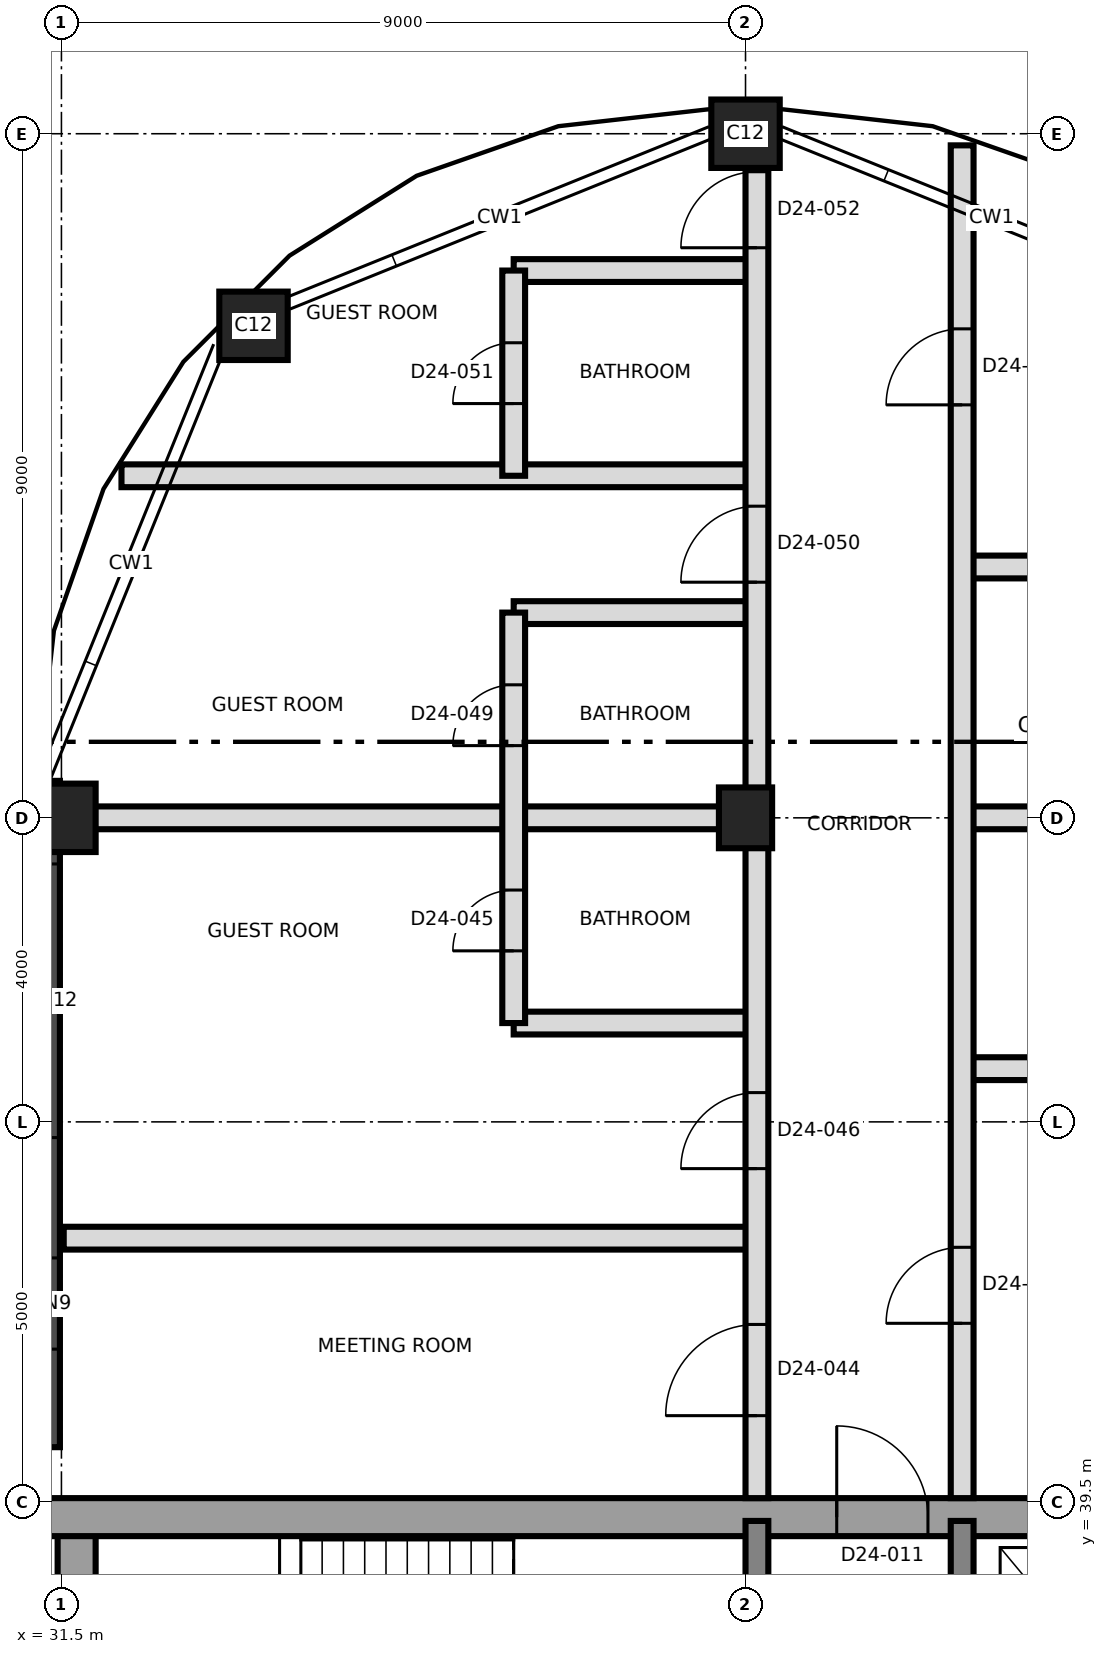
"""IFC4 building model, lengths in metres.
Left out: names, types, materials, properties, quantities, classifications, styles, units other than length and angle.
Written with IfcOpenShell. Run it as: python <this file> out.ifc"""

import sys

from ifc_helpers import new_model, si_unit, direction, frame, frame_2d, origin, origin_2d, place, context, subcontext, project, spatial, rectangle, extrude, element, fill, save


model = new_model("IFC4")
c1 = context("Model", 3, precision=1e-05, world=origin(), true_north=direction((0.0, 1.0)))
c2 = subcontext(c1, "Body", "Model", "MODEL_VIEW")
j1 = project(units=[si_unit("LENGTHUNIT", "METRE"), si_unit("PLANEANGLEUNIT", "RADIAN")], contexts=[c1])
p1 = place(None, origin())
s1 = spatial("IfcSite", under=j1, at=p1, CompositionType="ELEMENT")
p2 = place(p1, origin())
s2 = spatial("IfcBuilding", under=s1, at=p2, CompositionType="ELEMENT")
p3 = place(p2, frame((0.0, 0.0, 218.0)))
s3 = spatial("IfcBuildingStorey", under=s2, at=p3, CompositionType="ELEMENT", Elevation=218.0)
p4 = place(p3, frame((31.7, 21.75, 0.0), z_axis=(0.0, 0.0, 1.0), x_axis=(0.0, 1.0, 0.0)))
e1 = element("IfcWall", 1, at=p4, inside=s3, PredefinedType="SHEAR", context=c2, shape_type="SweptSolid", body=[
    extrude(rectangle(XDim=17.5, YDim=0.5, at=frame_2d((8.75, 0.0))), origin(), (0.0, 0.0, 1.0), 3.7),
])
p5 = place(p3, frame((31.25, 39.3, 0.0), z_axis=(0.0, 0.0, 1.0), x_axis=(1.0, 0.0, 0.0)))
e2 = element("IfcWall", 2, at=p5, inside=s3, PredefinedType="SHEAR", context=c2, shape_type="SweptSolid", body=[
    extrude(rectangle(XDim=27.0, YDim=0.5, at=frame_2d((13.5, 0.0))), origin(), (0.0, 0.0, 1.0), 3.7),
])
p6 = place(p5, frame((10.45, 0.0, 0.0)))
e3 = element("IfcOpeningElement", 3, at=p6, cuts=e2, PredefinedType="OPENING", context=c2, shape_type="SweptSolid", body=[
    extrude(rectangle(XDim=1.2, YDim=2.1, at=frame_2d((0.6, 1.05))), frame((0.0, 0.26, 0.0), z_axis=(0.0, -1.0, 0.0), x_axis=(1.0, 0.0, 0.0)), (0.0, 0.0, 1.0), 0.52),
])
for number, where, z_axis, x_axis in (
    (4, (40.65, 33.5, 0.0), (0.0, 0.0, 1.0), (0.0, 1.0, 0.0)),
    (5, (43.35, 33.5, 0.0), (0.0, 0.0, 1.0), (0.0, 1.0, 0.0)),
):
    element("IfcWall", number, at=place(p3, frame(where, z_axis=z_axis, x_axis=x_axis)), inside=s3, PredefinedType="SHEAR", context=c2, shape_type="SweptSolid", body=[
        extrude(rectangle(XDim=5.75, YDim=0.3, at=frame_2d((2.875, 0.0))), origin(), (0.0, 0.0, 1.0), 3.7),
    ])
p7 = place(p3, frame((31.5, 48.5, 0.0), z_axis=(0.0, 0.0, 1.0), x_axis=(1.0, 0.0, 0.0)))
e6 = element("IfcColumn", 6, at=p7, inside=s3, PredefinedType="COLUMN", context=c2, shape_type="SweptSolid", body=[
    extrude(rectangle(XDim=0.9, YDim=0.9, at=origin_2d()), origin(), (0.0, 0.0, 1.0), 3.7),
])
p8 = place(p3, frame((40.5, 48.5, 0.0), z_axis=(0.0, 0.0, 1.0), x_axis=(0.0, 1.0, 0.0)))
e7 = element("IfcColumn", 7, at=p8, inside=s3, PredefinedType="COLUMN", context=c2, shape_type="SweptSolid", body=[
    extrude(rectangle(XDim=0.8, YDim=0.7, at=origin_2d()), origin(), (0.0, 0.0, 1.0), 3.7),
])
for number, where, z_axis, x_axis in (
    (8, (34.027, 54.973, 0.0), (0.0, 0.0, 1.0), (1.0, 0.0, 0.0)),
    (9, (40.5, 57.5, 0.0), (0.0, 0.0, 1.0), (1.0, 0.0, 0.0)),
):
    element("IfcColumn", number, at=place(p3, frame(where, z_axis=z_axis, x_axis=x_axis)), inside=s3, PredefinedType="COLUMN", context=c2, shape_type="SweptSolid", body=[
        extrude(rectangle(XDim=0.9, YDim=0.9, at=origin_2d()), origin(), (0.0, 0.0, 1.0), 3.7),
    ])
p9 = place(p3, frame((31.33, 48.986, 0.0), z_axis=(0.0, 0.0, 1.0), x_axis=(0.0, -1.0, 0.0)))
e10 = element("IfcWall", 10, at=p9, inside=s3, PredefinedType="SOLIDWALL", context=c2, shape_type="SweptSolid", body=[
    extrude(rectangle(XDim=8.766, YDim=0.3, at=frame_2d((4.383, 0.0))), origin(), (0.0, 0.0, 1.0), 3.4),
])
p10 = place(p9, frame((1.093, 0.0, 0.9)))
e11 = element("IfcOpeningElement", 11, at=p10, cuts=e10, PredefinedType="OPENING", context=c2, shape_type="SweptSolid", body=[
    extrude(rectangle(XDim=3.6, YDim=1.5, at=frame_2d((1.8, 0.75))), frame((0.0, 0.16, 0.0), z_axis=(0.0, -1.0, 0.0), x_axis=(1.0, 0.0, 0.0)), (0.0, 0.0, 1.0), 0.32),
])
p11 = place(p9, frame((6.276, 0.0, 0.9)))
e12 = element("IfcOpeningElement", 12, at=p11, cuts=e10, PredefinedType="OPENING", context=c2, shape_type="SweptSolid", body=[
    extrude(rectangle(XDim=1.2, YDim=1.5, at=frame_2d((0.6, 0.75))), frame((0.0, 0.16, 0.0), z_axis=(0.0, -1.0, 0.0), x_axis=(1.0, 0.0, 0.0)), (0.0, 0.0, 1.0), 0.32),
])
p12 = place(p3, frame((31.53, 42.97, 0.0), z_axis=(0.0, 0.0, 1.0), x_axis=(1.0, 0.0, 0.0)))
e13 = element("IfcWall", 13, at=p12, inside=s3, PredefinedType="PARTITIONING", context=c2, shape_type="SweptSolid", body=[
    extrude(rectangle(XDim=9.12, YDim=0.3, at=frame_2d((4.56, 0.0))), origin(), (0.0, 0.0, 1.0), 3.4),
])
p13 = place(p3, frame((43.35, 45.2, 0.0), z_axis=(0.0, 0.0, 1.0), x_axis=(1.0, 0.0, 0.0)))
e14 = element("IfcWall", 14, at=p13, inside=s3, PredefinedType="PARTITIONING", context=c2, shape_type="SweptSolid", body=[
    extrude(rectangle(XDim=3.5, YDim=0.3, at=frame_2d((1.75, 0.0))), origin(), (0.0, 0.0, 1.0), 3.4),
])
p14 = place(p3, frame((37.45, 45.8, 0.0), z_axis=(0.0, 0.0, 1.0), x_axis=(1.0, 0.0, 0.0)))
e15 = element("IfcWall", 15, at=p14, inside=s3, PredefinedType="PARTITIONING", context=c2, shape_type="SweptSolid", body=[
    extrude(rectangle(XDim=3.2, YDim=0.3, at=frame_2d((1.6, 0.0))), origin(), (0.0, 0.0, 1.0), 3.4),
])
p15 = place(p3, frame((31.53, 48.5, 0.0), z_axis=(0.0, 0.0, 1.0), x_axis=(1.0, 0.0, 0.0)))
e16 = element("IfcWall", 16, at=p15, inside=s3, PredefinedType="PARTITIONING", context=c2, shape_type="SweptSolid", body=[
    extrude(rectangle(XDim=9.12, YDim=0.3, at=frame_2d((4.56, 0.0))), origin(), (0.0, 0.0, 1.0), 3.4),
])
p16 = place(p3, frame((43.35, 48.5, 0.0), z_axis=(0.0, 0.0, 1.0), x_axis=(1.0, 0.0, 0.0)))
e17 = element("IfcWall", 17, at=p16, inside=s3, PredefinedType="PARTITIONING", context=c2, shape_type="SweptSolid", body=[
    extrude(rectangle(XDim=6.12, YDim=0.3, at=frame_2d((3.06, 0.0))), origin(), (0.0, 0.0, 1.0), 3.4),
])
p17 = place(p3, frame((37.45, 51.2, 0.0), z_axis=(0.0, 0.0, 1.0), x_axis=(1.0, 0.0, 0.0)))
e18 = element("IfcWall", 18, at=p17, inside=s3, PredefinedType="PARTITIONING", context=c2, shape_type="SweptSolid", body=[
    extrude(rectangle(XDim=3.2, YDim=0.3, at=frame_2d((1.6, 0.0))), origin(), (0.0, 0.0, 1.0), 3.4),
])
p18 = place(p3, frame((43.35, 51.8, 0.0), z_axis=(0.0, 0.0, 1.0), x_axis=(1.0, 0.0, 0.0)))
e19 = element("IfcWall", 19, at=p18, inside=s3, PredefinedType="PARTITIONING", context=c2, shape_type="SweptSolid", body=[
    extrude(rectangle(XDim=3.5, YDim=0.3, at=frame_2d((1.75, 0.0))), origin(), (0.0, 0.0, 1.0), 3.4),
])
p19 = place(p3, frame((32.29, 53.0, 0.0), z_axis=(0.0, 0.0, 1.0), x_axis=(1.0, 0.0, 0.0)))
e20 = element("IfcWall", 20, at=p19, inside=s3, PredefinedType="PARTITIONING", context=c2, shape_type="SweptSolid", body=[
    extrude(rectangle(XDim=8.36, YDim=0.3, at=frame_2d((4.18, 0.0))), origin(), (0.0, 0.0, 1.0), 3.4),
])
p20 = place(p3, frame((37.45, 55.7, 0.0), z_axis=(0.0, 0.0, 1.0), x_axis=(1.0, 0.0, 0.0)))
e21 = element("IfcWall", 21, at=p20, inside=s3, PredefinedType="PARTITIONING", context=c2, shape_type="SweptSolid", body=[
    extrude(rectangle(XDim=3.2, YDim=0.3, at=frame_2d((1.6, 0.0))), origin(), (0.0, 0.0, 1.0), 3.4),
])
p21 = place(p3, frame((37.45, 45.8, 0.0), z_axis=(0.0, 0.0, 1.0), x_axis=(0.0, 1.0, 0.0)))
e22 = element("IfcWall", 22, at=p21, inside=s3, PredefinedType="PARTITIONING", context=c2, shape_type="SweptSolid", body=[
    extrude(rectangle(XDim=5.4, YDim=0.3, at=frame_2d((2.7, 0.0))), origin(), (0.0, 0.0, 1.0), 3.4),
])
p22 = place(p21, frame((0.95, 0.0, 0.0)))
e23 = element("IfcOpeningElement", 23, at=p22, cuts=e22, PredefinedType="OPENING", context=c2, shape_type="SweptSolid", body=[
    extrude(rectangle(XDim=0.8, YDim=2.1, at=frame_2d((0.4, 1.05))), frame((0.0, 0.16, 0.0), z_axis=(0.0, -1.0, 0.0), x_axis=(1.0, 0.0, 0.0)), (0.0, 0.0, 1.0), 0.32),
])
p23 = place(p21, frame((3.65, 0.0, 0.0)))
e24 = element("IfcOpeningElement", 24, at=p23, cuts=e22, PredefinedType="OPENING", context=c2, shape_type="SweptSolid", body=[
    extrude(rectangle(XDim=0.8, YDim=2.1, at=frame_2d((0.4, 1.05))), frame((0.0, 0.16, 0.0), z_axis=(0.0, -1.0, 0.0), x_axis=(1.0, 0.0, 0.0)), (0.0, 0.0, 1.0), 0.32),
])
p24 = place(p3, frame((37.45, 53.0, 0.0), z_axis=(0.0, 0.0, 1.0), x_axis=(0.0, 1.0, 0.0)))
e25 = element("IfcWall", 25, at=p24, inside=s3, PredefinedType="PARTITIONING", context=c2, shape_type="SweptSolid", body=[
    extrude(rectangle(XDim=2.7, YDim=0.3, at=frame_2d((1.35, 0.0))), origin(), (0.0, 0.0, 1.0), 3.4),
])
p25 = place(p24, frame((0.95, 0.0, 0.0)))
e26 = element("IfcOpeningElement", 26, at=p25, cuts=e25, PredefinedType="OPENING", context=c2, shape_type="SweptSolid", body=[
    extrude(rectangle(XDim=0.8, YDim=2.1, at=frame_2d((0.4, 1.05))), frame((0.0, 0.16, 0.0), z_axis=(0.0, -1.0, 0.0), x_axis=(1.0, 0.0, 0.0)), (0.0, 0.0, 1.0), 0.32),
])
p26 = place(p3, frame((40.65, 39.55, 0.0), z_axis=(0.0, 0.0, 1.0), x_axis=(0.0, 1.0, 0.0)))
e27 = element("IfcWall", 27, at=p26, inside=s3, PredefinedType="PARTITIONING", context=c2, shape_type="SweptSolid", body=[
    extrude(rectangle(XDim=17.92, YDim=0.3, at=frame_2d((8.96, 0.0))), origin(), (0.0, 0.0, 1.0), 3.4),
])
p27 = place(p26, frame((1.085, 0.0, 0.0)))
e28 = element("IfcOpeningElement", 28, at=p27, cuts=e27, PredefinedType="OPENING", context=c2, shape_type="SweptSolid", body=[
    extrude(rectangle(XDim=1.2, YDim=2.1, at=frame_2d((0.6, 1.05))), frame((0.0, 0.16, 0.0), z_axis=(0.0, -1.0, 0.0), x_axis=(1.0, 0.0, 0.0)), (0.0, 0.0, 1.0), 0.32),
])
p28 = place(p26, frame((4.335, 0.0, 0.0)))
e29 = element("IfcOpeningElement", 29, at=p28, cuts=e27, PredefinedType="OPENING", context=c2, shape_type="SweptSolid", body=[
    extrude(rectangle(XDim=1.0, YDim=2.1, at=frame_2d((0.5, 1.05))), frame((0.0, 0.16, 0.0), z_axis=(0.0, -1.0, 0.0), x_axis=(1.0, 0.0, 0.0)), (0.0, 0.0, 1.0), 0.32),
])
p29 = place(p26, frame((12.05, 0.0, 0.0)))
e30 = element("IfcOpeningElement", 30, at=p29, cuts=e27, PredefinedType="OPENING", context=c2, shape_type="SweptSolid", body=[
    extrude(rectangle(XDim=1.0, YDim=2.1, at=frame_2d((0.5, 1.05))), frame((0.0, 0.16, 0.0), z_axis=(0.0, -1.0, 0.0), x_axis=(1.0, 0.0, 0.0)), (0.0, 0.0, 1.0), 0.32),
])
p30 = place(p26, frame((16.45, 0.0, 0.0)))
e31 = element("IfcOpeningElement", 31, at=p30, cuts=e27, PredefinedType="OPENING", context=c2, shape_type="SweptSolid", body=[
    extrude(rectangle(XDim=1.0, YDim=2.1, at=frame_2d((0.5, 1.05))), frame((0.0, 0.16, 0.0), z_axis=(0.0, -1.0, 0.0), x_axis=(1.0, 0.0, 0.0)), (0.0, 0.0, 1.0), 0.32),
])
p31 = place(p3, frame((43.35, 39.55, 0.0), z_axis=(0.0, 0.0, 1.0), x_axis=(0.0, 1.0, 0.0)))
e32 = element("IfcWall", 32, at=p31, inside=s3, PredefinedType="PARTITIONING", context=c2, shape_type="SweptSolid", body=[
    extrude(rectangle(XDim=17.797, YDim=0.3, at=frame_2d((8.898, 0.0))), origin(), (0.0, 0.0, 1.0), 3.4),
])
p32 = place(p31, frame((2.3, 0.0, 0.0)))
e33 = element("IfcOpeningElement", 33, at=p32, cuts=e32, PredefinedType="OPENING", context=c2, shape_type="SweptSolid", body=[
    extrude(rectangle(XDim=1.0, YDim=2.4, at=frame_2d((0.5, 1.2))), frame((0.0, 0.16, 0.0), z_axis=(0.0, -1.0, 0.0), x_axis=(1.0, 0.0, 0.0)), (0.0, 0.0, 1.0), 0.32),
])
p33 = place(p31, frame((14.383, 0.0, 0.0)))
e34 = element("IfcOpeningElement", 34, at=p33, cuts=e32, PredefinedType="OPENING", context=c2, shape_type="SweptSolid", body=[
    extrude(rectangle(XDim=1.0, YDim=2.4, at=frame_2d((0.5, 1.2))), frame((0.0, 0.16, 0.0), z_axis=(0.0, -1.0, 0.0), x_axis=(1.0, 0.0, 0.0)), (0.0, 0.0, 1.0), 0.32),
])
p34 = place(p6, origin())
e35 = element("IfcDoor", 35, at=p34, inside=s3, OperationType="SINGLE_SWING_RIGHT", PredefinedType="DOOR", context=c2, shape_type="SweptSolid", body=[
    extrude(rectangle(XDim=1.2, YDim=2.1, at=frame_2d((0.6, 1.05))), frame((0.0, 0.025, 0.0), z_axis=(0.0, -1.0, 0.0), x_axis=(1.0, 0.0, 0.0)), (0.0, 0.0, 1.0), 0.05),
])
fill(e3, e35)
p35 = place(p32, origin())
e36 = element("IfcDoor", 36, at=p35, inside=s3, OperationType="SINGLE_SWING_RIGHT", PredefinedType="DOOR", context=c2, shape_type="SweptSolid", body=[
    extrude(rectangle(XDim=1.0, YDim=2.4, at=frame_2d((0.5, 1.2))), frame((0.0, 0.025, 0.0), z_axis=(0.0, -1.0, 0.0), x_axis=(1.0, 0.0, 0.0)), (0.0, 0.0, 1.0), 0.05),
])
fill(e33, e36)
p36 = place(p27, origin())
e37 = element("IfcDoor", 37, at=p36, inside=s3, OperationType="SINGLE_SWING_LEFT", PredefinedType="DOOR", context=c2, shape_type="SweptSolid", body=[
    extrude(rectangle(XDim=1.2, YDim=2.1, at=frame_2d((0.6, 1.05))), frame((0.0, 0.025, 0.0), z_axis=(0.0, -1.0, 0.0), x_axis=(1.0, 0.0, 0.0)), (0.0, 0.0, 1.0), 0.05),
])
fill(e28, e37)
p37 = place(p22, origin())
e38 = element("IfcDoor", 38, at=p37, inside=s3, OperationType="SINGLE_SWING_LEFT", PredefinedType="DOOR", context=c2, shape_type="SweptSolid", body=[
    extrude(rectangle(XDim=0.8, YDim=2.1, at=frame_2d((0.4, 1.05))), frame((0.0, 0.025, 0.0), z_axis=(0.0, -1.0, 0.0), x_axis=(1.0, 0.0, 0.0)), (0.0, 0.0, 1.0), 0.05),
])
fill(e23, e38)
p38 = place(p28, origin())
e39 = element("IfcDoor", 39, at=p38, inside=s3, OperationType="SINGLE_SWING_RIGHT", PredefinedType="DOOR", context=c2, shape_type="SweptSolid", body=[
    extrude(rectangle(XDim=1.0, YDim=2.1, at=frame_2d((0.5, 1.05))), frame((0.0, 0.025, 0.0), z_axis=(0.0, -1.0, 0.0), x_axis=(1.0, 0.0, 0.0)), (0.0, 0.0, 1.0), 0.05),
])
fill(e29, e39)
p39 = place(p33, origin())
e40 = element("IfcDoor", 40, at=p39, inside=s3, OperationType="SINGLE_SWING_LEFT", PredefinedType="DOOR", context=c2, shape_type="SweptSolid", body=[
    extrude(rectangle(XDim=1.0, YDim=2.4, at=frame_2d((0.5, 1.2))), frame((0.0, 0.025, 0.0), z_axis=(0.0, -1.0, 0.0), x_axis=(1.0, 0.0, 0.0)), (0.0, 0.0, 1.0), 0.05),
])
fill(e34, e40)
p40 = place(p23, origin())
e41 = element("IfcDoor", 41, at=p40, inside=s3, OperationType="SINGLE_SWING_LEFT", PredefinedType="DOOR", context=c2, shape_type="SweptSolid", body=[
    extrude(rectangle(XDim=0.8, YDim=2.1, at=frame_2d((0.4, 1.05))), frame((0.0, 0.025, 0.0), z_axis=(0.0, -1.0, 0.0), x_axis=(1.0, 0.0, 0.0)), (0.0, 0.0, 1.0), 0.05),
])
fill(e24, e41)
p41 = place(p29, origin())
e42 = element("IfcDoor", 42, at=p41, inside=s3, OperationType="SINGLE_SWING_LEFT", PredefinedType="DOOR", context=c2, shape_type="SweptSolid", body=[
    extrude(rectangle(XDim=1.0, YDim=2.1, at=frame_2d((0.5, 1.05))), frame((0.0, 0.025, 0.0), z_axis=(0.0, -1.0, 0.0), x_axis=(1.0, 0.0, 0.0)), (0.0, 0.0, 1.0), 0.05),
])
fill(e30, e42)
p42 = place(p25, origin())
e43 = element("IfcDoor", 43, at=p42, inside=s3, OperationType="SINGLE_SWING_LEFT", PredefinedType="DOOR", context=c2, shape_type="SweptSolid", body=[
    extrude(rectangle(XDim=0.8, YDim=2.1, at=frame_2d((0.4, 1.05))), frame((0.0, 0.025, 0.0), z_axis=(0.0, -1.0, 0.0), x_axis=(1.0, 0.0, 0.0)), (0.0, 0.0, 1.0), 0.05),
])
fill(e26, e43)
p43 = place(p30, origin())
e44 = element("IfcDoor", 44, at=p43, inside=s3, OperationType="SINGLE_SWING_RIGHT", PredefinedType="DOOR", context=c2, shape_type="SweptSolid", body=[
    extrude(rectangle(XDim=1.0, YDim=2.1, at=frame_2d((0.5, 1.05))), frame((0.0, 0.025, 0.0), z_axis=(0.0, -1.0, 0.0), x_axis=(1.0, 0.0, 0.0)), (0.0, 0.0, 1.0), 0.05),
])
fill(e31, e44)
save(model, sys.argv[1])
